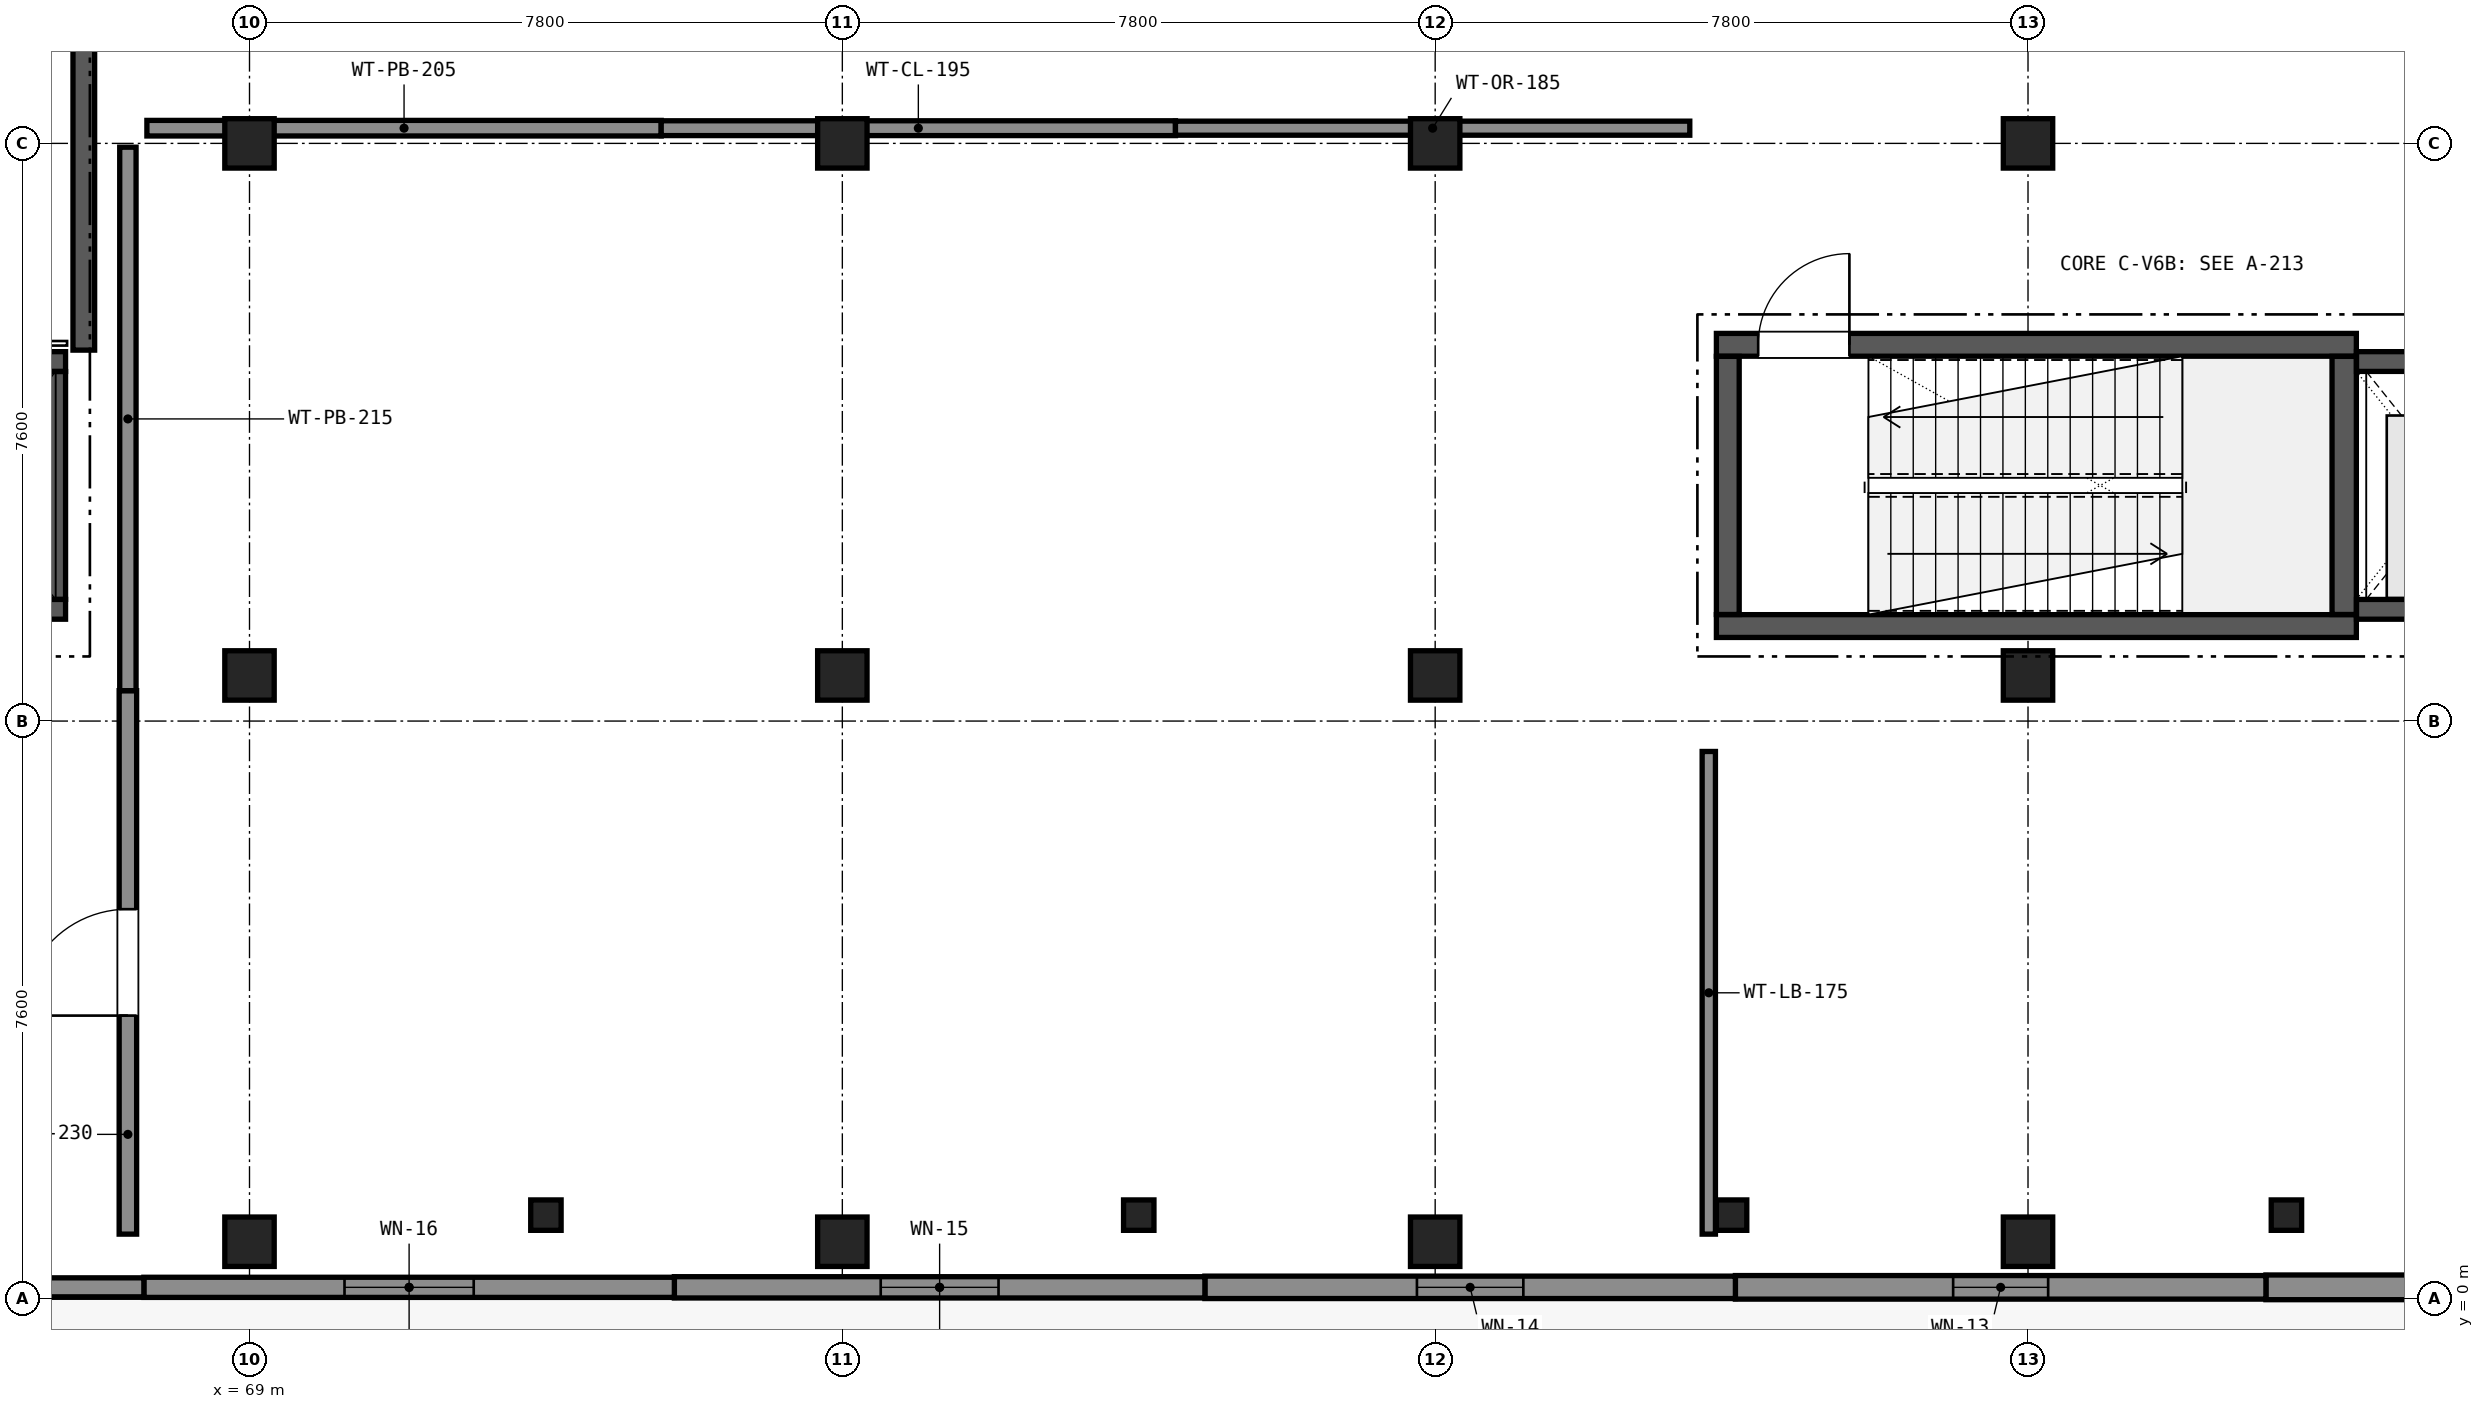
"""IFC4 building model, lengths in metres.
Left out: names, types, materials, properties, quantities, classifications, styles, units other than length and angle.
Written with IfcOpenShell. Run it as: python <this file> out.ifc"""

import sys

from ifc_helpers import new_model, si_unit, direction, frame, frame_2d, origin, origin_2d, place, context, subcontext, project, spatial, rectangle, extrude, element, fill, save


model = new_model("IFC4")
c1 = context("Model", 3, precision=1e-05, world=origin(), true_north=direction((0.0, 1.0)))
c2 = subcontext(c1, "Body", "Model", "MODEL_VIEW")
j1 = project(units=[si_unit("LENGTHUNIT", "METRE"), si_unit("PLANEANGLEUNIT", "RADIAN")], contexts=[c1])
p1 = place(None, origin())
s1 = spatial("IfcSite", under=j1, at=p1, CompositionType="ELEMENT")
p2 = place(p1, origin())
s2 = spatial("IfcBuilding", under=s1, at=p2, CompositionType="ELEMENT")
p3 = place(p2, origin())
s3 = spatial("IfcBuildingStorey", under=s2, at=p3, CompositionType="ELEMENT", Elevation=0.0)
for number, where, z_axis, x_axis in (
    (1, (69.0, 0.75, 0.0), (0.0, 0.0, 1.0), (1.0, 0.0, 0.0)),
    (2, (69.0, 8.2, 0.0), (0.0, 0.0, 1.0), (1.0, 0.0, 0.0)),
    (3, (69.0, 15.2, 0.0), (0.0, 0.0, 1.0), (1.0, 0.0, 0.0)),
    (4, (76.8, 0.75, 0.0), (0.0, 0.0, 1.0), (1.0, 0.0, 0.0)),
    (5, (76.8, 8.2, 0.0), (0.0, 0.0, 1.0), (1.0, 0.0, 0.0)),
    (6, (76.8, 15.2, 0.0), (0.0, 0.0, 1.0), (1.0, 0.0, 0.0)),
    (7, (84.6, 0.75, 0.0), (0.0, 0.0, 1.0), (1.0, 0.0, 0.0)),
    (8, (84.6, 8.2, 0.0), (0.0, 0.0, 1.0), (1.0, 0.0, 0.0)),
    (9, (84.6, 15.2, 0.0), (0.0, 0.0, 1.0), (1.0, 0.0, 0.0)),
    (10, (92.4, 0.75, 0.0), (0.0, 0.0, 1.0), (1.0, 0.0, 0.0)),
    (11, (92.4, 8.2, 0.0), (0.0, 0.0, 1.0), (1.0, 0.0, 0.0)),
    (12, (92.4, 15.2, 0.0), (0.0, 0.0, 1.0), (1.0, 0.0, 0.0)),
):
    element("IfcColumn", number, at=place(p3, frame(where, z_axis=z_axis, x_axis=x_axis)), inside=s3, PredefinedType="COLUMN", context=c2, shape_type="SweptSolid", body=[
        extrude(rectangle(XDim=0.65, YDim=0.65, at=origin_2d()), origin(), (0.0, 0.0, 1.0), 5.1),
    ])
for number, where, z_axis, x_axis in (
    (13, (72.9, 1.1, 0.0), (0.0, 0.0, 1.0), (1.0, 0.0, 0.0)),
    (14, (80.7, 1.1, 0.0), (0.0, 0.0, 1.0), (1.0, 0.0, 0.0)),
    (15, (88.5, 1.1, 0.0), (0.0, 0.0, 1.0), (1.0, 0.0, 0.0)),
    (16, (95.8, 1.1, 0.0), (0.0, 0.0, 1.0), (1.0, 0.0, 0.0)),
):
    element("IfcColumn", number, at=place(p3, frame(where, z_axis=z_axis, x_axis=x_axis)), inside=s3, PredefinedType="PILASTER", context=c2, shape_type="SweptSolid", body=[
        extrude(rectangle(XDim=0.4, YDim=0.4, at=origin_2d()), origin(), (0.0, 0.0, 1.0), 5.1),
    ])
p4 = place(p3, frame((102.51, 0.15, 0.0), z_axis=(0.0, 0.0, 1.0), x_axis=(-1.0, 0.0, 0.0)))
e17 = element("IfcWall", 17, at=p4, inside=s3, PredefinedType="SOLIDWALL", context=c2, shape_type="SweptSolid", body=[
    extrude(rectangle(XDim=6.98, YDim=0.325, at=frame_2d((3.49, 0.0))), origin(), (0.0, 0.0, 1.0), 4.77),
])
p5 = place(p4, frame((2.94, 0.0, 0.9)))
e18 = element("IfcOpeningElement", 18, at=p5, cuts=e17, PredefinedType="OPENING", context=c2, shape_type="SweptSolid", body=[
    extrude(rectangle(XDim=1.1, YDim=1.75, at=frame_2d((0.55, 0.875))), frame((0.0, 0.172, 0.0), z_axis=(0.0, -1.0, 0.0), x_axis=(1.0, 0.0, 0.0)), (0.0, 0.0, 1.0), 0.345),
])
p6 = place(p3, frame((95.53, 0.15, 0.0), z_axis=(0.0, 0.0, 1.0), x_axis=(-1.0, 0.0, 0.0)))
e19 = element("IfcWall", 19, at=p6, inside=s3, PredefinedType="SOLIDWALL", context=c2, shape_type="SweptSolid", body=[
    extrude(rectangle(XDim=6.98, YDim=0.31, at=frame_2d((3.49, 0.0))), origin(), (0.0, 0.0, 1.0), 4.77),
])
p7 = place(p6, frame((2.865, 0.0, 0.9)))
e20 = element("IfcOpeningElement", 20, at=p7, cuts=e19, PredefinedType="OPENING", context=c2, shape_type="SweptSolid", body=[
    extrude(rectangle(XDim=1.25, YDim=1.75, at=frame_2d((0.625, 0.875))), frame((0.0, 0.165, 0.0), z_axis=(0.0, -1.0, 0.0), x_axis=(1.0, 0.0, 0.0)), (0.0, 0.0, 1.0), 0.33),
])
p8 = place(p3, frame((88.55, 0.15, 0.0), z_axis=(0.0, 0.0, 1.0), x_axis=(-1.0, 0.0, 0.0)))
e21 = element("IfcWall", 21, at=p8, inside=s3, PredefinedType="SOLIDWALL", context=c2, shape_type="SweptSolid", body=[
    extrude(rectangle(XDim=6.98, YDim=0.295, at=frame_2d((3.49, 0.0))), origin(), (0.0, 0.0, 1.0), 4.77),
])
p9 = place(p8, frame((2.79, 0.0, 0.9)))
e22 = element("IfcOpeningElement", 22, at=p9, cuts=e21, PredefinedType="OPENING", context=c2, shape_type="SweptSolid", body=[
    extrude(rectangle(XDim=1.4, YDim=1.75, at=frame_2d((0.7, 0.875))), frame((0.0, 0.157, 0.0), z_axis=(0.0, -1.0, 0.0), x_axis=(1.0, 0.0, 0.0)), (0.0, 0.0, 1.0), 0.315),
])
p10 = place(p3, frame((81.57, 0.15, 0.0), z_axis=(0.0, 0.0, 1.0), x_axis=(-1.0, 0.0, 0.0)))
e23 = element("IfcWall", 23, at=p10, inside=s3, PredefinedType="SOLIDWALL", context=c2, shape_type="SweptSolid", body=[
    extrude(rectangle(XDim=6.98, YDim=0.28, at=frame_2d((3.49, 0.0))), origin(), (0.0, 0.0, 1.0), 4.77),
])
p11 = place(p10, frame((2.715, 0.0, 0.9)))
e24 = element("IfcOpeningElement", 24, at=p11, cuts=e23, PredefinedType="OPENING", context=c2, shape_type="SweptSolid", body=[
    extrude(rectangle(XDim=1.55, YDim=1.75, at=frame_2d((0.775, 0.875))), frame((0.0, 0.15, 0.0), z_axis=(0.0, -1.0, 0.0), x_axis=(1.0, 0.0, 0.0)), (0.0, 0.0, 1.0), 0.3),
])
p12 = place(p3, frame((74.59, 0.15, 0.0), z_axis=(0.0, 0.0, 1.0), x_axis=(-1.0, 0.0, 0.0)))
e25 = element("IfcWall", 25, at=p12, inside=s3, PredefinedType="SOLIDWALL", context=c2, shape_type="SweptSolid", body=[
    extrude(rectangle(XDim=6.98, YDim=0.265, at=frame_2d((3.49, 0.0))), origin(), (0.0, 0.0, 1.0), 4.77),
])
p13 = place(p12, frame((2.64, 0.0, 0.9)))
e26 = element("IfcOpeningElement", 26, at=p13, cuts=e25, PredefinedType="OPENING", context=c2, shape_type="SweptSolid", body=[
    extrude(rectangle(XDim=1.7, YDim=1.75, at=frame_2d((0.85, 0.875))), frame((0.0, 0.142, 0.0), z_axis=(0.0, -1.0, 0.0), x_axis=(1.0, 0.0, 0.0)), (0.0, 0.0, 1.0), 0.285),
])
p14 = place(p3, frame((67.61, 0.15, 0.0), z_axis=(0.0, 0.0, 1.0), x_axis=(-1.0, 0.0, 0.0)))
e27 = element("IfcWall", 27, at=p14, inside=s3, PredefinedType="SOLIDWALL", context=c2, shape_type="SweptSolid", body=[
    extrude(rectangle(XDim=6.98, YDim=0.25, at=frame_2d((3.49, 0.0))), origin(), (0.0, 0.0, 1.0), 4.77),
])
p15 = place(p14, frame((2.565, 0.0, 0.9)))
e28 = element("IfcOpeningElement", 28, at=p15, cuts=e27, PredefinedType="OPENING", context=c2, shape_type="SweptSolid", body=[
    extrude(rectangle(XDim=1.85, YDim=1.75, at=frame_2d((0.925, 0.875))), frame((0.0, 0.135, 0.0), z_axis=(0.0, -1.0, 0.0), x_axis=(1.0, 0.0, 0.0)), (0.0, 0.0, 1.0), 0.27),
])
p16 = place(p3, frame((63.922, 9.07, 0.0), z_axis=(0.0, 0.0, 1.0), x_axis=(1.0, 0.0, 0.0)))
e29 = element("IfcWall", 29, at=p16, inside=s3, PredefinedType="SHEAR", context=c2, shape_type="SweptSolid", body=[
    extrude(rectangle(XDim=2.658, YDim=0.26, at=frame_2d((1.329, 0.0))), origin(), (0.0, 0.0, 1.0), 4.77),
])
p17 = place(p3, frame((63.922, 12.33, 0.0), z_axis=(0.0, 0.0, 1.0), x_axis=(1.0, 0.0, 0.0)))
e30 = element("IfcWall", 30, at=p17, inside=s3, PredefinedType="SHEAR", context=c2, shape_type="SweptSolid", body=[
    extrude(rectangle(XDim=2.658, YDim=0.26, at=frame_2d((1.329, 0.0))), origin(), (0.0, 0.0, 1.0), 4.77),
])
p18 = place(p17, frame((0.619, 0.0, 0.0)))
e31 = element("IfcOpeningElement", 31, at=p18, cuts=e30, PredefinedType="OPENING", context=c2, shape_type="SweptSolid", body=[
    extrude(rectangle(XDim=1.42, YDim=2.25, at=frame_2d((0.71, 1.125))), frame((0.0, 0.14, 0.0), z_axis=(0.0, -1.0, 0.0), x_axis=(1.0, 0.0, 0.0)), (0.0, 0.0, 1.0), 0.28),
])
p19 = place(p3, frame((66.45, 9.202, 0.0), z_axis=(0.0, 0.0, 1.0), x_axis=(0.0, 1.0, 0.0)))
e32 = element("IfcWall", 32, at=p19, inside=s3, PredefinedType="SHEAR", context=c2, shape_type="SweptSolid", body=[
    extrude(rectangle(XDim=2.996, YDim=0.26, at=frame_2d((1.498, 0.0))), origin(), (0.0, 0.0, 1.0), 4.77),
])
p20 = place(p3, frame((66.82, 12.48, 0.0), z_axis=(0.0, 0.0, 1.0), x_axis=(0.0, 1.0, 0.0)))
e33 = element("IfcWall", 33, at=p20, inside=s3, PredefinedType="SHEAR", context=c2, shape_type="SweptSolid", body=[
    extrude(rectangle(XDim=4.03, YDim=0.285, at=frame_2d((2.015, 0.0))), origin(), (0.0, 0.0, 1.0), 4.22),
])
p21 = place(p3, frame((88.3, 8.85, 0.0), z_axis=(0.0, 0.0, 1.0), x_axis=(1.0, 0.0, 0.0)))
e34 = element("IfcWall", 34, at=p21, inside=s3, PredefinedType="SHEAR", context=c2, shape_type="SweptSolid", body=[
    extrude(rectangle(XDim=8.42, YDim=0.3, at=frame_2d((4.21, 0.0))), origin(), (0.0, 0.0, 1.0), 4.77),
])
p22 = place(p3, frame((88.3, 12.55, 0.0), z_axis=(0.0, 0.0, 1.0), x_axis=(1.0, 0.0, 0.0)))
e35 = element("IfcWall", 35, at=p22, inside=s3, PredefinedType="SHEAR", context=c2, shape_type="SweptSolid", body=[
    extrude(rectangle(XDim=8.42, YDim=0.3, at=frame_2d((4.21, 0.0))), origin(), (0.0, 0.0, 1.0), 4.77),
])
p23 = place(p22, frame((0.55, 0.0, 0.0)))
e36 = element("IfcOpeningElement", 36, at=p23, cuts=e35, PredefinedType="OPENING", context=c2, shape_type="SweptSolid", body=[
    extrude(rectangle(XDim=1.2, YDim=2.2, at=frame_2d((0.6, 1.1))), frame((0.0, 0.16, 0.0), z_axis=(0.0, -1.0, 0.0), x_axis=(1.0, 0.0, 0.0)), (0.0, 0.0, 1.0), 0.32),
])
p24 = place(p3, frame((88.45, 9.002, 0.0), z_axis=(0.0, 0.0, 1.0), x_axis=(0.0, 1.0, 0.0)))
e37 = element("IfcWall", 37, at=p24, inside=s3, PredefinedType="SHEAR", context=c2, shape_type="SweptSolid", body=[
    extrude(rectangle(XDim=3.396, YDim=0.3, at=frame_2d((1.698, 0.0))), origin(), (0.0, 0.0, 1.0), 4.77),
])
p25 = place(p3, frame((96.56, 9.002, 0.0), z_axis=(0.0, 0.0, 1.0), x_axis=(0.0, 1.0, 0.0)))
e38 = element("IfcWall", 38, at=p25, inside=s3, PredefinedType="SHEAR", context=c2, shape_type="SweptSolid", body=[
    extrude(rectangle(XDim=3.396, YDim=0.32, at=frame_2d((1.698, 0.0))), origin(), (0.0, 0.0, 1.0), 4.77),
])
p26 = place(p3, frame((96.722, 9.07, 0.0), z_axis=(0.0, 0.0, 1.0), x_axis=(1.0, 0.0, 0.0)))
e39 = element("IfcWall", 39, at=p26, inside=s3, PredefinedType="SHEAR", context=c2, shape_type="SweptSolid", body=[
    extrude(rectangle(XDim=2.658, YDim=0.26, at=frame_2d((1.329, 0.0))), origin(), (0.0, 0.0, 1.0), 4.77),
])
p27 = place(p3, frame((96.722, 12.33, 0.0), z_axis=(0.0, 0.0, 1.0), x_axis=(1.0, 0.0, 0.0)))
e40 = element("IfcWall", 40, at=p27, inside=s3, PredefinedType="SHEAR", context=c2, shape_type="SweptSolid", body=[
    extrude(rectangle(XDim=2.658, YDim=0.26, at=frame_2d((1.329, 0.0))), origin(), (0.0, 0.0, 1.0), 4.77),
])
p28 = place(p27, frame((0.679, 0.0, 0.0)))
e41 = element("IfcOpeningElement", 41, at=p28, cuts=e40, PredefinedType="OPENING", context=c2, shape_type="SweptSolid", body=[
    extrude(rectangle(XDim=1.3, YDim=2.2, at=frame_2d((0.65, 1.1))), frame((0.0, 0.14, 0.0), z_axis=(0.0, -1.0, 0.0), x_axis=(1.0, 0.0, 0.0)), (0.0, 0.0, 1.0), 0.28),
])
p29 = place(p3, frame((67.4, 0.85, 0.0), z_axis=(0.0, 0.0, 1.0), x_axis=(0.0, 1.0, 0.0)))
e42 = element("IfcWall", 42, at=p29, inside=s3, PredefinedType="PARTITIONING", context=c2, shape_type="SweptSolid", body=[
    extrude(rectangle(XDim=7.15, YDim=0.23, at=frame_2d((3.575, 0.0))), origin(), (0.0, 0.0, 1.0), 3.0),
])
p30 = place(p29, frame((2.875, 0.0, 0.0)))
e43 = element("IfcOpeningElement", 43, at=p30, cuts=e42, PredefinedType="OPENING", context=c2, shape_type="SweptSolid", body=[
    extrude(rectangle(XDim=1.4, YDim=2.2, at=frame_2d((0.7, 1.1))), frame((0.0, 0.125, 0.0), z_axis=(0.0, -1.0, 0.0), x_axis=(1.0, 0.0, 0.0)), (0.0, 0.0, 1.0), 0.25),
])
p31 = place(p3, frame((67.4, 8.0, 0.0), z_axis=(0.0, 0.0, 1.0), x_axis=(0.0, 1.0, 0.0)))
e44 = element("IfcWall", 44, at=p31, inside=s3, PredefinedType="PARTITIONING", context=c2, shape_type="SweptSolid", body=[
    extrude(rectangle(XDim=7.15, YDim=0.215, at=frame_2d((3.575, 0.0))), origin(), (0.0, 0.0, 1.0), 4.07),
])
p32 = place(p3, frame((67.65, 15.4, 0.0), z_axis=(0.0, 0.0, 1.0), x_axis=(1.0, 0.0, 0.0)))
e45 = element("IfcWall", 45, at=p32, inside=s3, PredefinedType="PARTITIONING", context=c2, shape_type="SweptSolid", body=[
    extrude(rectangle(XDim=6.767, YDim=0.205, at=frame_2d((3.384, 0.0))), origin(), (0.0, 0.0, 1.0), 4.12),
])
p33 = place(p3, frame((74.417, 15.4, 0.0), z_axis=(0.0, 0.0, 1.0), x_axis=(1.0, 0.0, 0.0)))
e46 = element("IfcWall", 46, at=p33, inside=s3, PredefinedType="PARTITIONING", context=c2, shape_type="SweptSolid", body=[
    extrude(rectangle(XDim=6.766, YDim=0.195, at=frame_2d((3.383, 0.0))), origin(), (0.0, 0.0, 1.0), 3.97),
])
p34 = place(p3, frame((81.183, 15.4, 0.0), z_axis=(0.0, 0.0, 1.0), x_axis=(1.0, 0.0, 0.0)))
e47 = element("IfcWall", 47, at=p34, inside=s3, PredefinedType="PARTITIONING", context=c2, shape_type="SweptSolid", body=[
    extrude(rectangle(XDim=6.767, YDim=0.185, at=frame_2d((3.383, 0.0))), origin(), (0.0, 0.0, 1.0), 4.07),
])
p35 = place(p3, frame((88.2, 7.2, 0.0), z_axis=(0.0, 0.0, 1.0), x_axis=(0.0, -1.0, 0.0)))
e48 = element("IfcWall", 48, at=p35, inside=s3, PredefinedType="PARTITIONING", context=c2, shape_type="SweptSolid", body=[
    extrude(rectangle(XDim=6.35, YDim=0.175, at=frame_2d((3.175, 0.0))), origin(), (0.0, 0.0, 1.0), 4.17),
])
p36 = place(p7, origin())
e49 = element("IfcWindow", 49, at=p36, inside=s3, PartitioningType="SINGLE_PANEL", PredefinedType="WINDOW", context=c2, shape_type="SweptSolid", body=[
    extrude(rectangle(XDim=1.25, YDim=1.75, at=frame_2d((0.625, 0.875))), frame((0.0, 0.03, 0.0), z_axis=(0.0, -1.0, 0.0), x_axis=(1.0, 0.0, 0.0)), (0.0, 0.0, 1.0), 0.06),
])
fill(e20, e49)
p37 = place(p9, origin())
e50 = element("IfcWindow", 50, at=p37, inside=s3, PartitioningType="SINGLE_PANEL", PredefinedType="WINDOW", context=c2, shape_type="SweptSolid", body=[
    extrude(rectangle(XDim=1.4, YDim=1.75, at=frame_2d((0.7, 0.875))), frame((0.0, 0.03, 0.0), z_axis=(0.0, -1.0, 0.0), x_axis=(1.0, 0.0, 0.0)), (0.0, 0.0, 1.0), 0.06),
])
fill(e22, e50)
p38 = place(p11, origin())
e51 = element("IfcWindow", 51, at=p38, inside=s3, PartitioningType="SINGLE_PANEL", PredefinedType="WINDOW", context=c2, shape_type="SweptSolid", body=[
    extrude(rectangle(XDim=1.55, YDim=1.75, at=frame_2d((0.775, 0.875))), frame((0.0, 0.03, 0.0), z_axis=(0.0, -1.0, 0.0), x_axis=(1.0, 0.0, 0.0)), (0.0, 0.0, 1.0), 0.06),
])
fill(e24, e51)
p39 = place(p13, origin())
e52 = element("IfcWindow", 52, at=p39, inside=s3, PartitioningType="SINGLE_PANEL", PredefinedType="WINDOW", context=c2, shape_type="SweptSolid", body=[
    extrude(rectangle(XDim=1.7, YDim=1.75, at=frame_2d((0.85, 0.875))), frame((0.0, 0.03, 0.0), z_axis=(0.0, -1.0, 0.0), x_axis=(1.0, 0.0, 0.0)), (0.0, 0.0, 1.0), 0.06),
])
fill(e26, e52)
p40 = place(p23, origin())
e53 = element("IfcDoor", 53, at=p40, inside=s3, OperationType="SINGLE_SWING_RIGHT", PredefinedType="DOOR", context=c2, shape_type="SweptSolid", body=[
    extrude(rectangle(XDim=1.2, YDim=2.2, at=frame_2d((0.6, 1.1))), frame((0.0, 0.025, 0.0), z_axis=(0.0, -1.0, 0.0), x_axis=(1.0, 0.0, 0.0)), (0.0, 0.0, 1.0), 0.05),
])
fill(e36, e53)
p41 = place(p30, origin())
e54 = element("IfcDoor", 54, at=p41, inside=s3, OperationType="SINGLE_SWING_LEFT", PredefinedType="DOOR", context=c2, shape_type="SweptSolid", body=[
    extrude(rectangle(XDim=1.4, YDim=2.2, at=frame_2d((0.7, 1.1))), frame((0.0, 0.025, 0.0), z_axis=(0.0, -1.0, 0.0), x_axis=(1.0, 0.0, 0.0)), (0.0, 0.0, 1.0), 0.05),
])
fill(e43, e54)
save(model, sys.argv[1])
